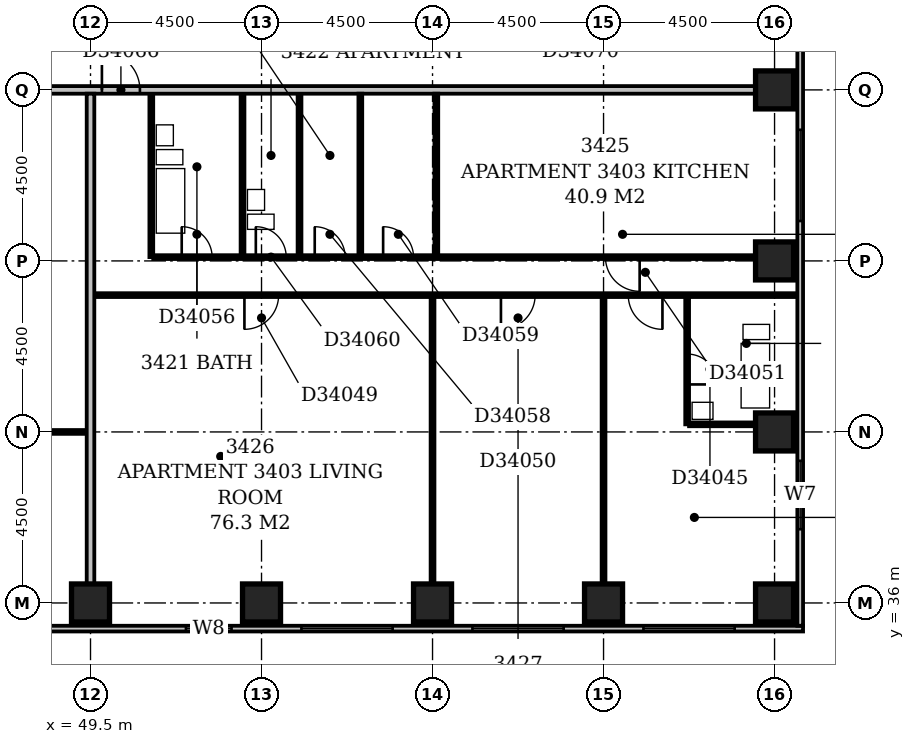
"""IFC4 building model, lengths in metres.
Left out: names, types, materials, properties, quantities, classifications, styles, units other than length and angle.
Written with IfcOpenShell. Run it as: python <this file> out.ifc"""

import sys

from ifc_helpers import new_model, si_unit, direction, frame, frame_2d, origin, origin_2d, place, context, subcontext, project, spatial, rectangle, extrude, element, fill, save


model = new_model("IFC4")
c1 = context("Model", 3, precision=1e-05, world=origin(), true_north=direction((0.0, 1.0)))
c2 = subcontext(c1, "Body", "Model", "MODEL_VIEW")
j1 = project(units=[si_unit("LENGTHUNIT", "METRE"), si_unit("PLANEANGLEUNIT", "RADIAN")], contexts=[c1])
p1 = place(None, origin())
s1 = spatial("IfcSite", under=j1, at=p1, CompositionType="ELEMENT")
p2 = place(p1, origin())
s2 = spatial("IfcBuilding", under=s1, at=p2, CompositionType="ELEMENT")
p3 = place(p2, frame((0.0, 0.0, 137.6)))
s3 = spatial("IfcBuildingStorey", under=s2, at=p3, CompositionType="ELEMENT", Elevation=137.6)
for number, where, z_axis, x_axis in (
    (1, (49.5, 36.0, -0.3), (0.0, 0.0, 1.0), (1.0, 0.0, 0.0)),
    (2, (54.0, 36.0, -0.3), (0.0, 0.0, 1.0), (1.0, 0.0, 0.0)),
    (3, (58.5, 36.0, -0.3), (0.0, 0.0, 1.0), (1.0, 0.0, 0.0)),
    (4, (63.0, 36.0, -0.3), (0.0, 0.0, 1.0), (1.0, 0.0, 0.0)),
    (5, (67.5, 36.0, -0.3), (0.0, 0.0, 1.0), (1.0, 0.0, 0.0)),
    (6, (67.5, 40.5, -0.3), (0.0, 0.0, 1.0), (1.0, 0.0, 0.0)),
    (7, (67.5, 45.0, -0.3), (0.0, 0.0, 1.0), (1.0, 0.0, 0.0)),
    (8, (67.5, 49.5, -0.3), (0.0, 0.0, 1.0), (1.0, 0.0, 0.0)),
):
    element("IfcColumn", number, at=place(p3, frame(where, z_axis=z_axis, x_axis=x_axis)), inside=s3, PredefinedType="COLUMN", context=c2, shape_type="SweptSolid", body=[
        extrude(rectangle(XDim=1.0, YDim=1.0, at=origin_2d()), origin(), (0.0, 0.0, 1.0), 3.6),
    ])
p4 = place(p3, frame((23.1, 35.325, 0.0), z_axis=(0.0, 0.0, 1.0), x_axis=(1.0, 0.0, 0.0)))
e9 = element("IfcWall", 9, at=p4, inside=s3, PredefinedType="STANDARD", context=c2, shape_type="SweptSolid", body=[
    extrude(rectangle(XDim=45.15, YDim=0.15, at=frame_2d((22.575, 0.0))), origin(), (0.0, 0.0, 1.0), 2.7),
])
p5 = place(p4, frame((2.235, 0.0, 0.6)))
e10 = element("IfcOpeningElement", 10, at=p5, cuts=e9, PredefinedType="OPENING", context=c2, shape_type="SweptSolid", body=[
    extrude(rectangle(XDim=0.9, YDim=1.8, at=frame_2d((0.45, 0.9))), frame((0.0, 0.087, 0.0), z_axis=(0.0, -1.0, 0.0), x_axis=(1.0, 0.0, 0.0)), (0.0, 0.0, 1.0), 0.174),
])
p6 = place(p4, frame((4.95, 0.0, 0.6)))
e11 = element("IfcOpeningElement", 11, at=p6, cuts=e9, PredefinedType="OPENING", context=c2, shape_type="SweptSolid", body=[
    extrude(rectangle(XDim=2.4, YDim=1.8, at=frame_2d((1.2, 0.9))), frame((0.0, 0.087, 0.0), z_axis=(0.0, -1.0, 0.0), x_axis=(1.0, 0.0, 0.0)), (0.0, 0.0, 1.0), 0.174),
])
p7 = place(p4, frame((9.45, 0.0, 0.6)))
e12 = element("IfcOpeningElement", 12, at=p7, cuts=e9, PredefinedType="OPENING", context=c2, shape_type="SweptSolid", body=[
    extrude(rectangle(XDim=2.4, YDim=1.8, at=frame_2d((1.2, 0.9))), frame((0.0, 0.087, 0.0), z_axis=(0.0, -1.0, 0.0), x_axis=(1.0, 0.0, 0.0)), (0.0, 0.0, 1.0), 0.174),
])
p8 = place(p4, frame((13.95, 0.0, 0.6)))
e13 = element("IfcOpeningElement", 13, at=p8, cuts=e9, PredefinedType="OPENING", context=c2, shape_type="SweptSolid", body=[
    extrude(rectangle(XDim=2.4, YDim=1.8, at=frame_2d((1.2, 0.9))), frame((0.0, 0.087, 0.0), z_axis=(0.0, -1.0, 0.0), x_axis=(1.0, 0.0, 0.0)), (0.0, 0.0, 1.0), 0.174),
])
p9 = place(p4, frame((18.45, 0.0, 0.6)))
e14 = element("IfcOpeningElement", 14, at=p9, cuts=e9, PredefinedType="OPENING", context=c2, shape_type="SweptSolid", body=[
    extrude(rectangle(XDim=2.4, YDim=1.8, at=frame_2d((1.2, 0.9))), frame((0.0, 0.087, 0.0), z_axis=(0.0, -1.0, 0.0), x_axis=(1.0, 0.0, 0.0)), (0.0, 0.0, 1.0), 0.174),
])
p10 = place(p4, frame((22.66, 0.0, 0.6)))
e15 = element("IfcOpeningElement", 15, at=p10, cuts=e9, PredefinedType="OPENING", context=c2, shape_type="SweptSolid", body=[
    extrude(rectangle(XDim=1.8, YDim=1.8, at=frame_2d((0.9, 0.9))), frame((0.0, 0.087, 0.0), z_axis=(0.0, -1.0, 0.0), x_axis=(1.0, 0.0, 0.0)), (0.0, 0.0, 1.0), 0.174),
])
p11 = place(p4, frame((28.911, 0.0, 0.6)))
e16 = element("IfcOpeningElement", 16, at=p11, cuts=e9, PredefinedType="OPENING", context=c2, shape_type="SweptSolid", body=[
    extrude(rectangle(XDim=1.2, YDim=1.8, at=frame_2d((0.6, 0.9))), frame((0.0, 0.087, 0.0), z_axis=(0.0, -1.0, 0.0), x_axis=(1.0, 0.0, 0.0)), (0.0, 0.0, 1.0), 0.174),
])
p12 = place(p4, frame((31.95, 0.0, 0.6)))
e17 = element("IfcOpeningElement", 17, at=p12, cuts=e9, PredefinedType="OPENING", context=c2, shape_type="SweptSolid", body=[
    extrude(rectangle(XDim=2.4, YDim=1.8, at=frame_2d((1.2, 0.9))), frame((0.0, 0.087, 0.0), z_axis=(0.0, -1.0, 0.0), x_axis=(1.0, 0.0, 0.0)), (0.0, 0.0, 1.0), 0.174),
])
p13 = place(p4, frame((36.45, 0.0, 0.6)))
e18 = element("IfcOpeningElement", 18, at=p13, cuts=e9, PredefinedType="OPENING", context=c2, shape_type="SweptSolid", body=[
    extrude(rectangle(XDim=2.4, YDim=1.8, at=frame_2d((1.2, 0.9))), frame((0.0, 0.087, 0.0), z_axis=(0.0, -1.0, 0.0), x_axis=(1.0, 0.0, 0.0)), (0.0, 0.0, 1.0), 0.174),
])
p14 = place(p4, frame((40.95, 0.0, 0.6)))
e19 = element("IfcOpeningElement", 19, at=p14, cuts=e9, PredefinedType="OPENING", context=c2, shape_type="SweptSolid", body=[
    extrude(rectangle(XDim=2.4, YDim=1.8, at=frame_2d((1.2, 0.9))), frame((0.0, 0.087, 0.0), z_axis=(0.0, -1.0, 0.0), x_axis=(1.0, 0.0, 0.0)), (0.0, 0.0, 1.0), 0.174),
])
p15 = place(p3, frame((68.175, 35.4, 0.0), z_axis=(0.0, 0.0, 1.0), x_axis=(0.0, 1.0, 0.0)))
e20 = element("IfcWall", 20, at=p15, inside=s3, PredefinedType="STANDARD", context=c2, shape_type="SweptSolid", body=[
    extrude(rectangle(XDim=23.85, YDim=0.15, at=frame_2d((11.925, 0.0))), origin(), (0.0, 0.0, 1.0), 2.7),
])
p16 = place(p15, frame((2.54, 0.0, 0.6)))
e21 = element("IfcOpeningElement", 21, at=p16, cuts=e20, PredefinedType="OPENING", context=c2, shape_type="SweptSolid", body=[
    extrude(rectangle(XDim=1.8, YDim=1.8, at=frame_2d((0.9, 0.9))), frame((0.0, 0.087, 0.0), z_axis=(0.0, -1.0, 0.0), x_axis=(1.0, 0.0, 0.0)), (0.0, 0.0, 1.0), 0.174),
])
p17 = place(p15, frame((10.65, 0.0, 0.6)))
e22 = element("IfcOpeningElement", 22, at=p17, cuts=e20, PredefinedType="OPENING", context=c2, shape_type="SweptSolid", body=[
    extrude(rectangle(XDim=2.4, YDim=1.8, at=frame_2d((1.2, 0.9))), frame((0.0, 0.087, 0.0), z_axis=(0.0, -1.0, 0.0), x_axis=(1.0, 0.0, 0.0)), (0.0, 0.0, 1.0), 0.174),
])
p18 = place(p3, frame((49.5, 36.5, 0.0), z_axis=(0.0, 0.0, 1.0), x_axis=(0.0, 1.0, 0.0)))
e23 = element("IfcWall", 23, at=p18, inside=s3, PredefinedType="PARTITIONING", context=c2, shape_type="SweptSolid", body=[
    extrude(rectangle(XDim=12.9, YDim=0.2, at=frame_2d((6.45, 0.0))), origin(), (0.0, 0.0, 1.0), 3.3),
])
p19 = place(p3, frame((58.5, 36.5, 0.0), z_axis=(0.0, 0.0, 1.0), x_axis=(0.0, 1.0, 0.0)))
e24 = element("IfcWall", 24, at=p19, inside=s3, PredefinedType="PARTITIONING", context=c2, shape_type="SweptSolid", body=[
    extrude(rectangle(XDim=7.55, YDim=0.1, at=frame_2d((3.775, 0.0))), origin(), (0.0, 0.0, 1.0), 3.3),
])
p20 = place(p3, frame((63.0, 36.5, 0.0), z_axis=(0.0, 0.0, 1.0), x_axis=(0.0, 1.0, 0.0)))
e25 = element("IfcWall", 25, at=p20, inside=s3, PredefinedType="PARTITIONING", context=c2, shape_type="SweptSolid", body=[
    extrude(rectangle(XDim=7.55, YDim=0.1, at=frame_2d((3.775, 0.0))), origin(), (0.0, 0.0, 1.0), 2.4),
])
p21 = place(p3, frame((45.1, 40.5, 0.0), z_axis=(0.0, 0.0, 1.0), x_axis=(1.0, 0.0, 0.0)))
e26 = element("IfcWall", 26, at=p21, inside=s3, PredefinedType="PARTITIONING", context=c2, shape_type="SweptSolid", body=[
    extrude(rectangle(XDim=4.3, YDim=0.1, at=frame_2d((2.15, 0.0))), origin(), (0.0, 0.0, 1.0), 3.3),
])
p22 = place(p21, frame((1.7, 0.0, 0.0)))
e27 = element("IfcOpeningElement", 27, at=p22, cuts=e26, PredefinedType="OPENING", context=c2, shape_type="SweptSolid", body=[
    extrude(rectangle(XDim=0.9, YDim=2.1, at=frame_2d((0.45, 1.05))), frame((0.0, 0.062, 0.0), z_axis=(0.0, -1.0, 0.0), x_axis=(1.0, 0.0, 0.0)), (0.0, 0.0, 1.0), 0.124),
])
p23 = place(p3, frame((65.2, 40.7, 0.0), z_axis=(0.0, 0.0, 1.0), x_axis=(0.0, 1.0, 0.0)))
e28 = element("IfcWall", 28, at=p23, inside=s3, PredefinedType="PLUMBINGWALL", context=c2, shape_type="SweptSolid", body=[
    extrude(rectangle(XDim=3.35, YDim=0.1, at=frame_2d((1.675, 0.0))), origin(), (0.0, 0.0, 1.0), 3.3),
])
p24 = place(p23, frame((1.05, 0.0, 0.0)))
e29 = element("IfcOpeningElement", 29, at=p24, cuts=e28, PredefinedType="OPENING", context=c2, shape_type="SweptSolid", body=[
    extrude(rectangle(XDim=0.8, YDim=2.1, at=frame_2d((0.4, 1.05))), frame((0.0, 0.062, 0.0), z_axis=(0.0, -1.0, 0.0), x_axis=(1.0, 0.0, 0.0)), (0.0, 0.0, 1.0), 0.124),
])
p25 = place(p3, frame((65.25, 40.7, 0.0), z_axis=(0.0, 0.0, 1.0), x_axis=(1.0, 0.0, 0.0)))
e30 = element("IfcWall", 30, at=p25, inside=s3, PredefinedType="PLUMBINGWALL", context=c2, shape_type="SweptSolid", body=[
    extrude(rectangle(XDim=1.75, YDim=0.1, at=frame_2d((0.875, 0.0))), origin(), (0.0, 0.0, 1.0), 3.3),
])
p26 = place(p3, frame((49.6, 44.1, 0.0), z_axis=(0.0, 0.0, 1.0), x_axis=(1.0, 0.0, 0.0)))
e31 = element("IfcWall", 31, at=p26, inside=s3, PredefinedType="PARTITIONING", context=c2, shape_type="SweptSolid", body=[
    extrude(rectangle(XDim=18.5, YDim=0.1, at=frame_2d((9.25, 0.0))), origin(), (0.0, 0.0, 1.0), 3.3),
])
p27 = place(p26, frame((3.95, 0.0, 0.0)))
e32 = element("IfcOpeningElement", 32, at=p27, cuts=e31, PredefinedType="OPENING", context=c2, shape_type="SweptSolid", body=[
    extrude(rectangle(XDim=0.9, YDim=2.1, at=frame_2d((0.45, 1.05))), frame((0.0, 0.062, 0.0), z_axis=(0.0, -1.0, 0.0), x_axis=(1.0, 0.0, 0.0)), (0.0, 0.0, 1.0), 0.124),
])
p28 = place(p26, frame((10.7, 0.0, 0.0)))
e33 = element("IfcOpeningElement", 33, at=p28, cuts=e31, PredefinedType="OPENING", context=c2, shape_type="SweptSolid", body=[
    extrude(rectangle(XDim=0.9, YDim=2.1, at=frame_2d((0.45, 1.05))), frame((0.0, 0.062, 0.0), z_axis=(0.0, -1.0, 0.0), x_axis=(1.0, 0.0, 0.0)), (0.0, 0.0, 1.0), 0.124),
])
p29 = place(p26, frame((14.05, 0.0, 0.0)))
e34 = element("IfcOpeningElement", 34, at=p29, cuts=e31, PredefinedType="OPENING", context=c2, shape_type="SweptSolid", body=[
    extrude(rectangle(XDim=0.9, YDim=2.1, at=frame_2d((0.45, 1.05))), frame((0.0, 0.062, 0.0), z_axis=(0.0, -1.0, 0.0), x_axis=(1.0, 0.0, 0.0)), (0.0, 0.0, 1.0), 0.124),
])
p30 = place(p3, frame((51.1, 45.1, 0.0), z_axis=(0.0, 0.0, 1.0), x_axis=(0.0, 1.0, 0.0)))
e35 = element("IfcWall", 35, at=p30, inside=s3, PredefinedType="PLUMBINGWALL", context=c2, shape_type="SweptSolid", body=[
    extrude(rectangle(XDim=4.3, YDim=0.1, at=frame_2d((2.15, 0.0))), origin(), (0.0, 0.0, 1.0), 3.3),
])
p31 = place(p3, frame((51.15, 45.1, 0.0), z_axis=(0.0, 0.0, 1.0), x_axis=(1.0, 0.0, 0.0)))
e36 = element("IfcWall", 36, at=p31, inside=s3, PredefinedType="PARTITIONING", context=c2, shape_type="SweptSolid", body=[
    extrude(rectangle(XDim=15.85, YDim=0.1, at=frame_2d((7.925, 0.0))), origin(), (0.0, 0.0, 1.0), 3.3),
])
p32 = place(p31, frame((0.75, 0.0, 0.0)))
e37 = element("IfcOpeningElement", 37, at=p32, cuts=e36, PredefinedType="OPENING", context=c2, shape_type="SweptSolid", body=[
    extrude(rectangle(XDim=0.8, YDim=2.1, at=frame_2d((0.4, 1.05))), frame((0.0, 0.062, 0.0), z_axis=(0.0, -1.0, 0.0), x_axis=(1.0, 0.0, 0.0)), (0.0, 0.0, 1.0), 0.124),
])
p33 = place(p31, frame((11.9, 0.0, 0.0)))
e38 = element("IfcOpeningElement", 38, at=p33, cuts=e36, PredefinedType="OPENING", context=c2, shape_type="SweptSolid", body=[
    extrude(rectangle(XDim=0.9, YDim=2.1, at=frame_2d((0.45, 1.05))), frame((0.0, 0.062, 0.0), z_axis=(0.0, -1.0, 0.0), x_axis=(1.0, 0.0, 0.0)), (0.0, 0.0, 1.0), 0.124),
])
p34 = place(p31, frame((4.25, 0.0, 0.0)))
e39 = element("IfcOpeningElement", 39, at=p34, cuts=e36, PredefinedType="OPENING", context=c2, shape_type="SweptSolid", body=[
    extrude(rectangle(XDim=0.8, YDim=2.1, at=frame_2d((0.4, 1.05))), frame((0.0, 0.062, 0.0), z_axis=(0.0, -1.0, 0.0), x_axis=(1.0, 0.0, 0.0)), (0.0, 0.0, 1.0), 0.124),
])
p35 = place(p31, frame((6.05, 0.0, 0.0)))
e40 = element("IfcOpeningElement", 40, at=p35, cuts=e36, PredefinedType="OPENING", context=c2, shape_type="SweptSolid", body=[
    extrude(rectangle(XDim=0.8, YDim=2.1, at=frame_2d((0.4, 1.05))), frame((0.0, 0.062, 0.0), z_axis=(0.0, -1.0, 0.0), x_axis=(1.0, 0.0, 0.0)), (0.0, 0.0, 1.0), 0.124),
])
p36 = place(p31, frame((2.7, 0.0, 0.0)))
e41 = element("IfcOpeningElement", 41, at=p36, cuts=e36, PredefinedType="OPENING", context=c2, shape_type="SweptSolid", body=[
    extrude(rectangle(XDim=0.8, YDim=2.1, at=frame_2d((0.4, 1.05))), frame((0.0, 0.062, 0.0), z_axis=(0.0, -1.0, 0.0), x_axis=(1.0, 0.0, 0.0)), (0.0, 0.0, 1.0), 0.124),
])
p37 = place(p3, frame((53.5, 45.15, 0.0), z_axis=(0.0, 0.0, 1.0), x_axis=(0.0, 1.0, 0.0)))
e42 = element("IfcWall", 42, at=p37, inside=s3, PredefinedType="PLUMBINGWALL", context=c2, shape_type="SweptSolid", body=[
    extrude(rectangle(XDim=4.25, YDim=0.1, at=frame_2d((2.125, 0.0))), origin(), (0.0, 0.0, 1.0), 2.6),
])
p38 = place(p3, frame((55.0, 45.15, 0.0), z_axis=(0.0, 0.0, 1.0), x_axis=(0.0, 1.0, 0.0)))
e43 = element("IfcWall", 43, at=p38, inside=s3, PredefinedType="PLUMBINGWALL", context=c2, shape_type="SweptSolid", body=[
    extrude(rectangle(XDim=4.25, YDim=0.1, at=frame_2d((2.125, 0.0))), origin(), (0.0, 0.0, 1.0), 3.3),
])
for number, where, z_axis, x_axis in (
    (44, (56.6, 45.15, 0.0), (0.0, 0.0, 1.0), (0.0, 1.0, 0.0)),
    (45, (58.6, 45.15, 0.0), (0.0, 0.0, 1.0), (0.0, 1.0, 0.0)),
):
    element("IfcWall", number, at=place(p3, frame(where, z_axis=z_axis, x_axis=x_axis)), inside=s3, PredefinedType="PARTITIONING", context=c2, shape_type="SweptSolid", body=[
        extrude(rectangle(XDim=4.25, YDim=0.1, at=frame_2d((2.125, 0.0))), origin(), (0.0, 0.0, 1.0), 3.3),
    ])
p39 = place(p3, frame((48.35, 49.5, 0.0), z_axis=(0.0, 0.0, 1.0), x_axis=(1.0, 0.0, 0.0)))
e46 = element("IfcWall", 46, at=p39, inside=s3, PredefinedType="PARTITIONING", context=c2, shape_type="SweptSolid", body=[
    extrude(rectangle(XDim=18.65, YDim=0.2, at=frame_2d((9.325, 0.0))), origin(), (0.0, 0.0, 1.0), 3.3),
])
p40 = place(p39, frame((1.45, 0.0, 0.0)))
e47 = element("IfcOpeningElement", 47, at=p40, cuts=e46, PredefinedType="OPENING", context=c2, shape_type="SweptSolid", body=[
    extrude(rectangle(XDim=1.0, YDim=2.1, at=frame_2d((0.5, 1.05))), frame((0.0, 0.112, 0.0), z_axis=(0.0, -1.0, 0.0), x_axis=(1.0, 0.0, 0.0)), (0.0, 0.0, 1.0), 0.224),
])
p41 = place(p11, origin())
e48 = element("IfcWindow", 48, at=p41, inside=s3, PartitioningType="SINGLE_PANEL", PredefinedType="WINDOW", context=c2, shape_type="SweptSolid", body=[
    extrude(rectangle(XDim=1.2, YDim=1.8, at=frame_2d((0.6, 0.9))), frame((0.0, 0.03, 0.0), z_axis=(0.0, -1.0, 0.0), x_axis=(1.0, 0.0, 0.0)), (0.0, 0.0, 1.0), 0.06),
])
fill(e16, e48)
p42 = place(p12, origin())
e49 = element("IfcWindow", 49, at=p42, inside=s3, PartitioningType="SINGLE_PANEL", PredefinedType="WINDOW", context=c2, shape_type="SweptSolid", body=[
    extrude(rectangle(XDim=2.4, YDim=1.8, at=frame_2d((1.2, 0.9))), frame((0.0, 0.03, 0.0), z_axis=(0.0, -1.0, 0.0), x_axis=(1.0, 0.0, 0.0)), (0.0, 0.0, 1.0), 0.06),
])
fill(e17, e49)
p43 = place(p13, origin())
e50 = element("IfcWindow", 50, at=p43, inside=s3, PartitioningType="SINGLE_PANEL", PredefinedType="WINDOW", context=c2, shape_type="SweptSolid", body=[
    extrude(rectangle(XDim=2.4, YDim=1.8, at=frame_2d((1.2, 0.9))), frame((0.0, 0.03, 0.0), z_axis=(0.0, -1.0, 0.0), x_axis=(1.0, 0.0, 0.0)), (0.0, 0.0, 1.0), 0.06),
])
fill(e18, e50)
p44 = place(p14, origin())
e51 = element("IfcWindow", 51, at=p44, inside=s3, PartitioningType="SINGLE_PANEL", PredefinedType="WINDOW", context=c2, shape_type="SweptSolid", body=[
    extrude(rectangle(XDim=2.4, YDim=1.8, at=frame_2d((1.2, 0.9))), frame((0.0, 0.03, 0.0), z_axis=(0.0, -1.0, 0.0), x_axis=(1.0, 0.0, 0.0)), (0.0, 0.0, 1.0), 0.06),
])
fill(e19, e51)
p45 = place(p16, origin())
e52 = element("IfcWindow", 52, at=p45, inside=s3, PartitioningType="SINGLE_PANEL", PredefinedType="WINDOW", context=c2, shape_type="SweptSolid", body=[
    extrude(rectangle(XDim=1.8, YDim=1.8, at=frame_2d((0.9, 0.9))), frame((0.0, 0.03, 0.0), z_axis=(0.0, -1.0, 0.0), x_axis=(1.0, 0.0, 0.0)), (0.0, 0.0, 1.0), 0.06),
])
fill(e21, e52)
p46 = place(p17, origin())
e53 = element("IfcWindow", 53, at=p46, inside=s3, PartitioningType="SINGLE_PANEL", PredefinedType="WINDOW", context=c2, shape_type="SweptSolid", body=[
    extrude(rectangle(XDim=2.4, YDim=1.8, at=frame_2d((1.2, 0.9))), frame((0.0, 0.03, 0.0), z_axis=(0.0, -1.0, 0.0), x_axis=(1.0, 0.0, 0.0)), (0.0, 0.0, 1.0), 0.06),
])
fill(e22, e53)
p47 = place(p24, frame((0.8, 0.0, 0.0), z_axis=(0.0, 0.0, 1.0), x_axis=(-1.0, 0.0, 0.0)))
e54 = element("IfcDoor", 54, at=p47, inside=s3, OperationType="SINGLE_SWING_RIGHT", PredefinedType="DOOR", context=c2, shape_type="SweptSolid", body=[
    extrude(rectangle(XDim=0.8, YDim=2.1, at=frame_2d((0.4, 1.05))), frame((0.0, 0.025, 0.0), z_axis=(0.0, -1.0, 0.0), x_axis=(1.0, 0.0, 0.0)), (0.0, 0.0, 1.0), 0.05),
])
fill(e29, e54)
p48 = place(p27, frame((0.9, 0.0, 0.0), z_axis=(0.0, 0.0, 1.0), x_axis=(-1.0, 0.0, 0.0)))
e55 = element("IfcDoor", 55, at=p48, inside=s3, OperationType="SINGLE_SWING_RIGHT", PredefinedType="DOOR", context=c2, shape_type="SweptSolid", body=[
    extrude(rectangle(XDim=0.9, YDim=2.1, at=frame_2d((0.45, 1.05))), frame((0.0, 0.025, 0.0), z_axis=(0.0, -1.0, 0.0), x_axis=(1.0, 0.0, 0.0)), (0.0, 0.0, 1.0), 0.05),
])
fill(e32, e55)
p49 = place(p28, frame((0.9, 0.0, 0.0), z_axis=(0.0, 0.0, 1.0), x_axis=(-1.0, 0.0, 0.0)))
e56 = element("IfcDoor", 56, at=p49, inside=s3, OperationType="SINGLE_SWING_RIGHT", PredefinedType="DOOR", context=c2, shape_type="SweptSolid", body=[
    extrude(rectangle(XDim=0.9, YDim=2.1, at=frame_2d((0.45, 1.05))), frame((0.0, 0.025, 0.0), z_axis=(0.0, -1.0, 0.0), x_axis=(1.0, 0.0, 0.0)), (0.0, 0.0, 1.0), 0.05),
])
fill(e33, e56)
p50 = place(p29, origin())
e57 = element("IfcDoor", 57, at=p50, inside=s3, OperationType="SINGLE_SWING_RIGHT", PredefinedType="DOOR", context=c2, shape_type="SweptSolid", body=[
    extrude(rectangle(XDim=0.9, YDim=2.1, at=frame_2d((0.45, 1.05))), frame((0.0, 0.025, 0.0), z_axis=(0.0, -1.0, 0.0), x_axis=(1.0, 0.0, 0.0)), (0.0, 0.0, 1.0), 0.05),
])
fill(e34, e57)
p51 = place(p32, origin())
e58 = element("IfcDoor", 58, at=p51, inside=s3, OperationType="SINGLE_SWING_LEFT", PredefinedType="DOOR", context=c2, shape_type="SweptSolid", body=[
    extrude(rectangle(XDim=0.8, YDim=2.1, at=frame_2d((0.4, 1.05))), frame((0.0, 0.025, 0.0), z_axis=(0.0, -1.0, 0.0), x_axis=(1.0, 0.0, 0.0)), (0.0, 0.0, 1.0), 0.05),
])
fill(e37, e58)
p52 = place(p33, origin())
e59 = element("IfcDoor", 59, at=p52, inside=s3, OperationType="SINGLE_SWING_RIGHT", PredefinedType="DOOR", context=c2, shape_type="SweptSolid", body=[
    extrude(rectangle(XDim=0.9, YDim=2.1, at=frame_2d((0.45, 1.05))), frame((0.0, 0.025, 0.0), z_axis=(0.0, -1.0, 0.0), x_axis=(1.0, 0.0, 0.0)), (0.0, 0.0, 1.0), 0.05),
])
fill(e38, e59)
p53 = place(p34, origin())
e60 = element("IfcDoor", 60, at=p53, inside=s3, OperationType="SINGLE_SWING_LEFT", PredefinedType="DOOR", context=c2, shape_type="SweptSolid", body=[
    extrude(rectangle(XDim=0.8, YDim=2.1, at=frame_2d((0.4, 1.05))), frame((0.0, 0.025, 0.0), z_axis=(0.0, -1.0, 0.0), x_axis=(1.0, 0.0, 0.0)), (0.0, 0.0, 1.0), 0.05),
])
fill(e39, e60)
p54 = place(p35, origin())
e61 = element("IfcDoor", 61, at=p54, inside=s3, OperationType="SINGLE_SWING_LEFT", PredefinedType="DOOR", context=c2, shape_type="SweptSolid", body=[
    extrude(rectangle(XDim=0.8, YDim=2.1, at=frame_2d((0.4, 1.05))), frame((0.0, 0.025, 0.0), z_axis=(0.0, -1.0, 0.0), x_axis=(1.0, 0.0, 0.0)), (0.0, 0.0, 1.0), 0.05),
])
fill(e40, e61)
p55 = place(p36, origin())
e62 = element("IfcDoor", 62, at=p55, inside=s3, OperationType="SINGLE_SWING_LEFT", PredefinedType="DOOR", context=c2, shape_type="SweptSolid", body=[
    extrude(rectangle(XDim=0.8, YDim=2.1, at=frame_2d((0.4, 1.05))), frame((0.0, 0.025, 0.0), z_axis=(0.0, -1.0, 0.0), x_axis=(1.0, 0.0, 0.0)), (0.0, 0.0, 1.0), 0.05),
])
fill(e41, e62)
p56 = place(p40, origin())
e63 = element("IfcDoor", 63, at=p56, inside=s3, OperationType="SINGLE_SWING_LEFT", PredefinedType="DOOR", context=c2, shape_type="SweptSolid", body=[
    extrude(rectangle(XDim=1.0, YDim=2.1, at=frame_2d((0.5, 1.05))), frame((0.0, 0.025, 0.0), z_axis=(0.0, -1.0, 0.0), x_axis=(1.0, 0.0, 0.0)), (0.0, 0.0, 1.0), 0.05),
])
fill(e47, e63)
save(model, sys.argv[1])
